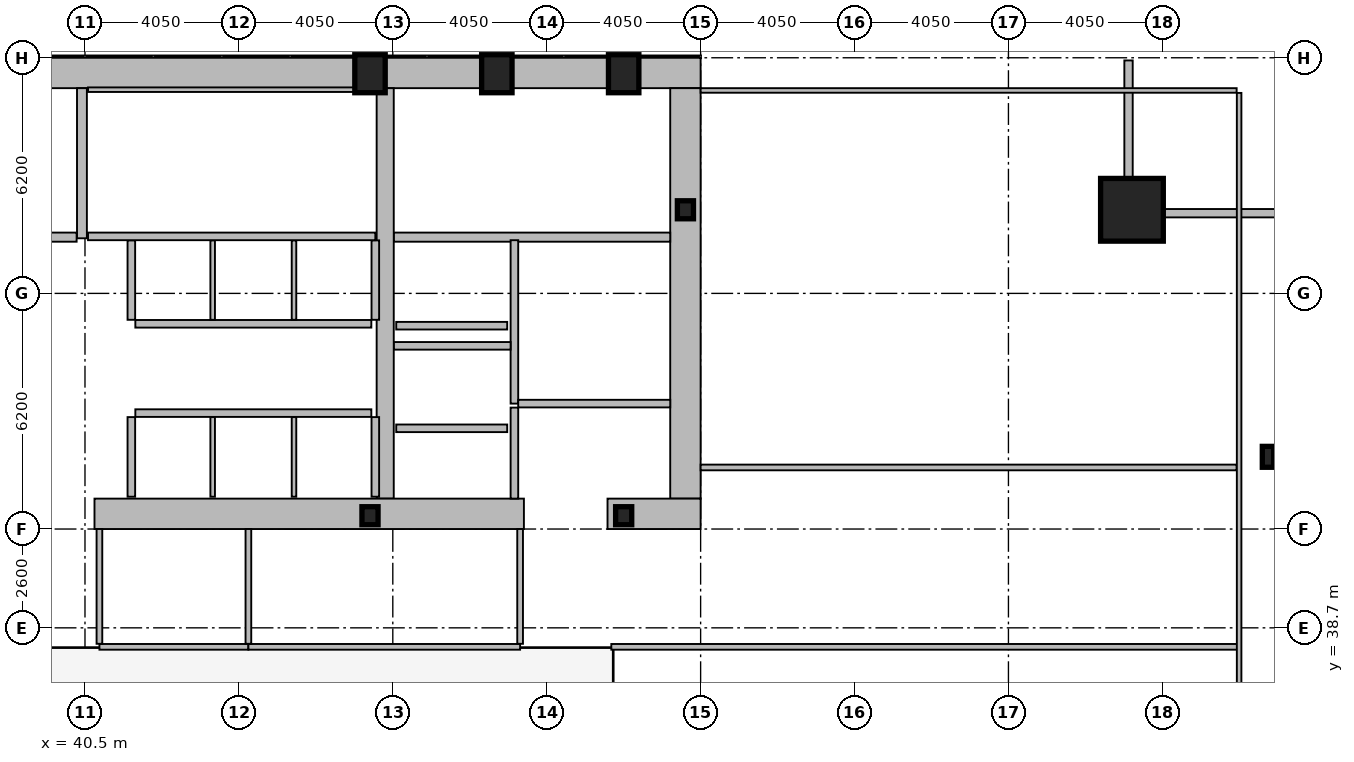
"""IFC4 building model, lengths in metres.
Left out: names, types, materials, properties, quantities, classifications, styles, units other than length and angle.
Written with IfcOpenShell. Run it as: python <this file> out.ifc"""

import sys

from ifc_helpers import new_model, si_unit, direction, frame, frame_2d, origin, origin_2d, place, context, subcontext, project, spatial, rectangle, hollow_rectangle, i_section, extrude, element, fill, save


model = new_model("IFC4")
c1 = context("Model", 3, precision=1e-05, world=origin(), true_north=direction((0.0, 1.0)))
c2 = subcontext(c1, "Body", "Model", "MODEL_VIEW")
j1 = project(units=[si_unit("LENGTHUNIT", "METRE"), si_unit("PLANEANGLEUNIT", "RADIAN")], contexts=[c1])
p1 = place(None, origin())
s1 = spatial("IfcSite", under=j1, at=p1, CompositionType="ELEMENT")
p2 = place(p1, origin())
s2 = spatial("IfcBuilding", under=s1, at=p2, CompositionType="ELEMENT")
p3 = place(p2, frame((0.0, 0.0, 25.8)))
s3 = spatial("IfcBuildingStorey", under=s2, at=p3, CompositionType="ELEMENT", Elevation=25.8)
p4 = place(p3, frame((16.2, 53.3, 0.0), z_axis=(0.0, 0.0, 1.0), x_axis=(1.0, 0.0, 0.0)))
e1 = element("IfcWall", 1, at=p4, inside=s3, PredefinedType="SHEAR", context=c2, shape_type="SweptSolid", body=[
    extrude(rectangle(XDim=40.5, YDim=0.8, at=frame_2d((20.25, 0.0))), origin(), (0.0, 0.0, 1.0), 3.82),
])
p5 = place(p3, frame((56.3, 52.9, 0.0), z_axis=(0.0, 0.0, 1.0), x_axis=(0.0, -1.0, 0.0)))
e2 = element("IfcWall", 2, at=p5, inside=s3, PredefinedType="SHEAR", context=c2, shape_type="SweptSolid", body=[
    extrude(rectangle(XDim=10.8, YDim=0.8, at=frame_2d((5.4, 0.0))), origin(), (0.0, 0.0, 1.0), 3.82),
])
p6 = place(p3, frame((48.4, 42.1, 0.0), z_axis=(0.0, 0.0, 1.0), x_axis=(0.0, 1.0, 0.0)))
e3 = element("IfcWall", 3, at=p6, inside=s3, PredefinedType="SHEAR", context=c2, shape_type="SweptSolid", body=[
    extrude(rectangle(XDim=10.8, YDim=0.45, at=frame_2d((5.4, 0.0))), origin(), (0.0, 0.0, 1.0), 3.82),
])
p7 = place(p3, frame((52.05, 41.7, 0.0), z_axis=(0.0, 0.0, 1.0), x_axis=(-1.0, 0.0, 0.0)))
e4 = element("IfcWall", 4, at=p7, inside=s3, PredefinedType="SHEAR", context=c2, shape_type="SweptSolid", body=[
    extrude(rectangle(XDim=11.3, YDim=0.8, at=frame_2d((5.65, 0.0))), origin(), (0.0, 0.0, 1.0), 3.82),
])
p8 = place(p3, frame((56.7, 41.7, 0.0), z_axis=(0.0, 0.0, 1.0), x_axis=(-1.0, 0.0, 0.0)))
e5 = element("IfcWall", 5, at=p8, inside=s3, PredefinedType="SHEAR", context=c2, shape_type="SweptSolid", body=[
    extrude(rectangle(XDim=2.45, YDim=0.8, at=frame_2d((1.225, 0.0))), origin(), (0.0, 0.0, 1.0), 3.82),
])
p9 = place(p3, frame((40.42, 48.95, 0.0), z_axis=(0.0, 0.0, 1.0), x_axis=(0.0, 1.0, 0.0)))
e6 = element("IfcWall", 6, at=p9, inside=s3, PredefinedType="SHEAR", context=c2, shape_type="SweptSolid", body=[
    extrude(rectangle(XDim=3.95, YDim=0.26, at=frame_2d((1.975, 0.0))), origin(), (0.0, 0.0, 1.0), 3.82),
])
p10 = place(p3, frame((48.63, 48.98, 0.0), z_axis=(0.0, 0.0, 1.0), x_axis=(1.0, 0.0, 0.0)))
e7 = element("IfcWall", 7, at=p10, inside=s3, PredefinedType="SHEAR", context=c2, shape_type="SweptSolid", body=[
    extrude(rectangle(XDim=7.27, YDim=0.24, at=frame_2d((3.635, 0.0))), origin(), (0.0, 0.0, 1.0), 3.82),
])
p11 = place(p10, frame((6.0, 0.0, 0.0)))
e8 = element("IfcOpeningElement", 8, at=p11, cuts=e7, PredefinedType="OPENING", context=c2, shape_type="SweptSolid", body=[
    extrude(rectangle(XDim=1.05, YDim=2.15, at=frame_2d((0.525, 1.075))), frame((0.0, 0.13, 0.0), z_axis=(0.0, -1.0, 0.0), x_axis=(1.0, 0.0, 0.0)), (0.0, 0.0, 1.0), 0.26),
])
p12 = place(p3, frame((32.72, 48.98, 0.0), z_axis=(0.0, 0.0, 1.0), x_axis=(1.0, 0.0, 0.0)))
e9 = element("IfcWall", 9, at=p12, inside=s3, PredefinedType="SHEAR", context=c2, shape_type="SweptSolid", body=[
    extrude(rectangle(XDim=7.56, YDim=0.24, at=frame_2d((3.78, 0.0))), origin(), (0.0, 0.0, 1.0), 3.82),
])
p13 = place(p12, frame((0.22, 0.0, 0.0)))
e10 = element("IfcOpeningElement", 10, at=p13, cuts=e9, PredefinedType="OPENING", context=c2, shape_type="SweptSolid", body=[
    extrude(rectangle(XDim=1.05, YDim=2.15, at=frame_2d((0.525, 1.075))), frame((0.0, 0.13, 0.0), z_axis=(0.0, -1.0, 0.0), x_axis=(1.0, 0.0, 0.0)), (0.0, 0.0, 1.0), 0.26),
])
p14 = place(p3, frame((68.05, 49.7, 0.0), z_axis=(0.0, 0.0, 1.0), x_axis=(1.0, 0.0, 0.0)))
e11 = element("IfcColumn", 11, at=p14, inside=s3, PredefinedType="COLUMN", context=c2, shape_type="SweptSolid", body=[
    extrude(hollow_rectangle(XDim=1.65, YDim=1.65, WallThickness=0.075, at=origin_2d()), origin(), (0.0, 0.0, 1.0), 4.0),
])
for number, where, z_axis, x_axis in (
    (12, (48.0, 53.28, 0.0), (0.0, 0.0, 1.0), (1.0, 0.0, 0.0)),
    (13, (51.337, 53.28, 0.0), (0.0, 0.0, 1.0), (1.0, 0.0, 0.0)),
    (14, (54.675, 53.28, 0.0), (0.0, 0.0, 1.0), (1.0, 0.0, 0.0)),
):
    element("IfcColumn", number, at=place(p3, frame(where, z_axis=z_axis, x_axis=x_axis)), inside=s3, PredefinedType="COLUMN", context=c2, shape_type="SweptSolid", body=[
        extrude(hollow_rectangle(XDim=0.8, YDim=1.0, WallThickness=0.055, at=origin_2d()), origin(), (0.0, 0.0, 1.0), 4.0),
    ])
p15 = place(p3, frame((71.63, 43.2, 0.0), z_axis=(0.0, 0.0, 1.0), x_axis=(1.0, 0.0, 0.0)))
e15 = element("IfcColumn", 15, at=p15, inside=s3, PredefinedType="COLUMN", context=c2, shape_type="SweptSolid", body=[
    extrude(i_section(OverallWidth=0.3, OverallDepth=0.55, WebThickness=0.015, FlangeThickness=0.029, at=origin_2d()), origin(), (0.0, 0.0, 1.0), 4.0),
])
for number, where, z_axis, x_axis in (
    (16, (56.3, 49.7, 0.0), (0.0, 0.0, 1.0), (1.0, 0.0, 0.0)),
    (17, (48.0, 41.65, 0.0), (0.0, 0.0, 1.0), (1.0, 0.0, 0.0)),
    (18, (54.675, 41.65, 0.0), (0.0, 0.0, 1.0), (1.0, 0.0, 0.0)),
):
    element("IfcColumn", number, at=place(p3, frame(where, z_axis=z_axis, x_axis=x_axis)), inside=s3, PredefinedType="COLUMN", context=c2, shape_type="SweptSolid", body=[
        extrude(i_section(OverallWidth=0.424, OverallDepth=0.474, WebThickness=0.048, FlangeThickness=0.077, at=origin_2d()), origin(), (0.0, 0.0, 1.0), 4.0),
    ])
p16 = place(p3, frame((67.96, 53.63, 0.0), z_axis=(0.0, 0.0, 1.0), x_axis=(0.0, -1.0, 0.0)))
e19 = element("IfcWall", 19, at=p16, inside=s3, PredefinedType="SOLIDWALL", context=c2, shape_type="SweptSolid", body=[
    extrude(rectangle(XDim=3.91, YDim=0.22, at=frame_2d((1.955, 0.0))), origin(), (0.0, 0.0, 1.0), 3.16),
])
p17 = place(p3, frame((67.85, 49.61, 0.0), z_axis=(0.0, 0.0, 1.0), x_axis=(1.0, 0.0, 0.0)))
e20 = element("IfcWall", 20, at=p17, inside=s3, PredefinedType="SOLIDWALL", context=c2, shape_type="SweptSolid", body=[
    extrude(rectangle(XDim=4.22, YDim=0.22, at=frame_2d((2.11, 0.0))), origin(), (0.0, 0.0, 1.0), 3.16),
])
p18 = place(p3, frame((51.61, 43.95, 0.0), z_axis=(0.0, 0.0, 1.0), x_axis=(-1.0, 0.0, 0.0)))
e21 = element("IfcWall", 21, at=p18, inside=s3, PredefinedType="PARTITIONING", context=c2, shape_type="SweptSolid", body=[
    extrude(rectangle(XDim=2.92, YDim=0.2, at=frame_2d((1.46, 0.0))), origin(), (0.0, 0.0, 1.0), 3.82),
])
p19 = place(p18, frame((0.81, 0.0, 0.0)))
e22 = element("IfcOpeningElement", 22, at=p19, cuts=e21, PredefinedType="OPENING", context=c2, shape_type="SweptSolid", body=[
    extrude(rectangle(XDim=1.3, YDim=2.18, at=frame_2d((0.65, 1.09))), frame((0.0, 0.11, 0.0), z_axis=(0.0, -1.0, 0.0), x_axis=(1.0, 0.0, 0.0)), (0.0, 0.0, 1.0), 0.22),
])
p20 = place(p3, frame((51.61, 46.65, 0.0), z_axis=(0.0, 0.0, 1.0), x_axis=(-1.0, 0.0, 0.0)))
e23 = element("IfcWall", 23, at=p20, inside=s3, PredefinedType="PARTITIONING", context=c2, shape_type="SweptSolid", body=[
    extrude(rectangle(XDim=2.92, YDim=0.2, at=frame_2d((1.46, 0.0))), origin(), (0.0, 0.0, 1.0), 3.82),
])
p21 = place(p20, frame((0.86, 0.0, 0.0)))
e24 = element("IfcOpeningElement", 24, at=p21, cuts=e23, PredefinedType="OPENING", context=c2, shape_type="SweptSolid", body=[
    extrude(rectangle(XDim=1.2, YDim=2.18, at=frame_2d((0.6, 1.09))), frame((0.0, 0.11, 0.0), z_axis=(0.0, -1.0, 0.0), x_axis=(1.0, 0.0, 0.0)), (0.0, 0.0, 1.0), 0.22),
])
p22 = place(p3, frame((51.8, 44.6, 0.0), z_axis=(0.0, 0.0, 1.0), x_axis=(0.0, 1.0, 0.0)))
e25 = element("IfcWall", 25, at=p22, inside=s3, PredefinedType="PARTITIONING", context=c2, shape_type="SweptSolid", body=[
    extrude(rectangle(XDim=4.3, YDim=0.2, at=frame_2d((2.15, 0.0))), origin(), (0.0, 0.0, 1.0), 3.82),
])
p23 = place(p3, frame((51.9, 44.6, 0.0), z_axis=(0.0, 0.0, 1.0), x_axis=(1.0, 0.0, 0.0)))
e26 = element("IfcWall", 26, at=p23, inside=s3, PredefinedType="PARTITIONING", context=c2, shape_type="SweptSolid", body=[
    extrude(rectangle(XDim=4.0, YDim=0.2, at=frame_2d((2.0, 0.0))), origin(), (0.0, 0.0, 1.0), 3.82),
])
p24 = place(p23, frame((1.15, 0.0, 0.0)))
e27 = element("IfcOpeningElement", 27, at=p24, cuts=e26, PredefinedType="OPENING", context=c2, shape_type="SweptSolid", body=[
    extrude(rectangle(XDim=1.05, YDim=2.15, at=frame_2d((0.525, 1.075))), frame((0.0, 0.11, 0.0), z_axis=(0.0, -1.0, 0.0), x_axis=(1.0, 0.0, 0.0)), (0.0, 0.0, 1.0), 0.22),
])
p25 = place(p3, frame((48.63, 46.12, 0.0), z_axis=(0.0, 0.0, 1.0), x_axis=(1.0, 0.0, 0.0)))
e28 = element("IfcWall", 28, at=p25, inside=s3, PredefinedType="PARTITIONING", context=c2, shape_type="SweptSolid", body=[
    extrude(rectangle(XDim=3.07, YDim=0.2, at=frame_2d((1.535, 0.0))), origin(), (0.0, 0.0, 1.0), 3.82),
])
p26 = place(p3, frame((51.8, 42.1, 0.0), z_axis=(0.0, 0.0, 1.0), x_axis=(0.0, 1.0, 0.0)))
e29 = element("IfcWall", 29, at=p26, inside=s3, PredefinedType="PARTITIONING", context=c2, shape_type="SweptSolid", body=[
    extrude(rectangle(XDim=2.395, YDim=0.2, at=frame_2d((1.198, 0.0))), origin(), (0.0, 0.0, 1.0), 3.82),
])
p27 = place(p26, frame((0.38, 0.0, 0.0)))
e30 = element("IfcOpeningElement", 30, at=p27, cuts=e29, PredefinedType="OPENING", context=c2, shape_type="SweptSolid", body=[
    extrude(rectangle(XDim=1.05, YDim=2.15, at=frame_2d((0.525, 1.075))), frame((0.0, 0.11, 0.0), z_axis=(0.0, -1.0, 0.0), x_axis=(1.0, 0.0, 0.0)), (0.0, 0.0, 1.0), 0.22),
])
p28 = place(p3, frame((41.825, 46.7, 0.0), z_axis=(0.0, 0.0, 1.0), x_axis=(1.0, 0.0, 0.0)))
e31 = element("IfcWall", 31, at=p28, inside=s3, PredefinedType="PARTITIONING", context=c2, shape_type="SweptSolid", body=[
    extrude(rectangle(XDim=6.21, YDim=0.2, at=frame_2d((3.105, 0.0))), origin(), (0.0, 0.0, 1.0), 3.82),
])
for number, where, z_axis, x_axis in (
    (32, (41.72, 46.805, 0.0), (0.0, 0.0, 1.0), (0.0, 1.0, 0.0)),
    (33, (48.14, 46.805, 0.0), (0.0, 0.0, 1.0), (0.0, 1.0, 0.0)),
):
    element("IfcWall", number, at=place(p3, frame(where, z_axis=z_axis, x_axis=x_axis)), inside=s3, PredefinedType="PARTITIONING", context=c2, shape_type="SweptSolid", body=[
        extrude(rectangle(XDim=2.09, YDim=0.2, at=frame_2d((1.045, 0.0))), origin(), (0.0, 0.0, 1.0), 3.82),
    ])
for number, where, z_axis, x_axis in (
    (34, (43.86, 46.805, 0.0), (0.0, 0.0, 1.0), (0.0, 1.0, 0.0)),
    (35, (46.0, 46.805, 0.0), (0.0, 0.0, 1.0), (0.0, 1.0, 0.0)),
):
    element("IfcWall", number, at=place(p3, frame(where, z_axis=z_axis, x_axis=x_axis)), inside=s3, PredefinedType="PARTITIONING", context=c2, shape_type="SweptSolid", body=[
        extrude(rectangle(XDim=2.09, YDim=0.12, at=frame_2d((1.045, 0.0))), origin(), (0.0, 0.0, 1.0), 3.82),
    ])
p29 = place(p3, frame((41.825, 44.35, 0.0), z_axis=(0.0, 0.0, 1.0), x_axis=(1.0, 0.0, 0.0)))
e36 = element("IfcWall", 36, at=p29, inside=s3, PredefinedType="PARTITIONING", context=c2, shape_type="SweptSolid", body=[
    extrude(rectangle(XDim=6.21, YDim=0.2, at=frame_2d((3.105, 0.0))), origin(), (0.0, 0.0, 1.0), 3.82),
])
for number, where, z_axis, x_axis in (
    (37, (41.72, 42.15, 0.0), (0.0, 0.0, 1.0), (0.0, 1.0, 0.0)),
    (38, (48.14, 42.15, 0.0), (0.0, 0.0, 1.0), (0.0, 1.0, 0.0)),
):
    element("IfcWall", number, at=place(p3, frame(where, z_axis=z_axis, x_axis=x_axis)), inside=s3, PredefinedType="PARTITIONING", context=c2, shape_type="SweptSolid", body=[
        extrude(rectangle(XDim=2.095, YDim=0.2, at=frame_2d((1.048, 0.0))), origin(), (0.0, 0.0, 1.0), 3.82),
    ])
for number, where, z_axis, x_axis in (
    (39, (43.86, 42.15, 0.0), (0.0, 0.0, 1.0), (0.0, 1.0, 0.0)),
    (40, (46.0, 42.15, 0.0), (0.0, 0.0, 1.0), (0.0, 1.0, 0.0)),
):
    element("IfcWall", number, at=place(p3, frame(where, z_axis=z_axis, x_axis=x_axis)), inside=s3, PredefinedType="PARTITIONING", context=c2, shape_type="SweptSolid", body=[
        extrude(rectangle(XDim=2.095, YDim=0.12, at=frame_2d((1.048, 0.0))), origin(), (0.0, 0.0, 1.0), 3.82),
    ])
p30 = place(p3, frame((40.58, 52.86, 0.0), z_axis=(0.0, 0.0, 1.0), x_axis=(1.0, 0.0, 0.0)))
e41 = element("IfcWall", 41, at=p30, inside=s3, PredefinedType="PARTITIONING", context=c2, shape_type="SweptSolid", body=[
    extrude(rectangle(XDim=7.56, YDim=0.12, at=frame_2d((3.78, 0.0))), origin(), (0.0, 0.0, 1.0), 3.82),
])
p31 = place(p3, frame((40.58, 49.0, 0.0), z_axis=(0.0, 0.0, 1.0), x_axis=(1.0, 0.0, 0.0)))
e42 = element("IfcWall", 42, at=p31, inside=s3, PredefinedType="PARTITIONING", context=c2, shape_type="SweptSolid", body=[
    extrude(rectangle(XDim=7.56, YDim=0.2, at=frame_2d((3.78, 0.0))), origin(), (0.0, 0.0, 1.0), 3.82),
])
p32 = place(p31, frame((0.16, 0.0, 0.0)))
e43 = element("IfcOpeningElement", 43, at=p32, cuts=e42, PredefinedType="OPENING", context=c2, shape_type="SweptSolid", body=[
    extrude(rectangle(XDim=0.95, YDim=2.1, at=frame_2d((0.475, 1.05))), frame((0.0, 0.11, 0.0), z_axis=(0.0, -1.0, 0.0), x_axis=(1.0, 0.0, 0.0)), (0.0, 0.0, 1.0), 0.22),
])
p33 = place(p3, frame((40.88, 38.2, 0.0), z_axis=(0.0, 0.0, 1.0), x_axis=(1.0, 0.0, 0.0)))
e44 = element("IfcWall", 44, at=p33, inside=s3, PredefinedType="PARTITIONING", context=c2, shape_type="SweptSolid", body=[
    extrude(rectangle(XDim=3.92, YDim=0.15, at=frame_2d((1.96, 0.0))), origin(), (0.0, 0.0, 1.0), 3.01),
])
p34 = place(p33, frame((1.1, 0.0, 0.0)))
e45 = element("IfcOpeningElement", 45, at=p34, cuts=e44, PredefinedType="OPENING", context=c2, shape_type="SweptSolid", body=[
    extrude(rectangle(XDim=0.9, YDim=2.05, at=frame_2d((0.45, 1.025))), frame((0.0, 0.085, 0.0), z_axis=(0.0, -1.0, 0.0), x_axis=(1.0, 0.0, 0.0)), (0.0, 0.0, 1.0), 0.17),
])
p35 = place(p3, frame((44.8, 38.2, 0.0), z_axis=(0.0, 0.0, 1.0), x_axis=(1.0, 0.0, 0.0)))
e46 = element("IfcWall", 46, at=p35, inside=s3, PredefinedType="PARTITIONING", context=c2, shape_type="SweptSolid", body=[
    extrude(rectangle(XDim=7.15, YDim=0.15, at=frame_2d((3.575, 0.0))), origin(), (0.0, 0.0, 1.0), 3.01),
])
p36 = place(p35, frame((1.1, 0.0, 0.0)))
e47 = element("IfcOpeningElement", 47, at=p36, cuts=e46, PredefinedType="OPENING", context=c2, shape_type="SweptSolid", body=[
    extrude(rectangle(XDim=1.0, YDim=2.05, at=frame_2d((0.5, 1.025))), frame((0.0, 0.085, 0.0), z_axis=(0.0, -1.0, 0.0), x_axis=(1.0, 0.0, 0.0)), (0.0, 0.0, 1.0), 0.17),
])
for number, where, z_axis, x_axis in (
    (48, (40.88, 38.28, 0.0), (0.0, 0.0, 1.0), (0.0, 1.0, 0.0)),
    (49, (44.8, 38.28, 0.0), (0.0, 0.0, 1.0), (0.0, 1.0, 0.0)),
    (50, (51.95, 38.28, 0.0), (0.0, 0.0, 1.0), (0.0, 1.0, 0.0)),
):
    element("IfcWall", number, at=place(p3, frame(where, z_axis=z_axis, x_axis=x_axis)), inside=s3, PredefinedType="PARTITIONING", context=c2, shape_type="SweptSolid", body=[
        extrude(rectangle(XDim=3.02, YDim=0.15, at=frame_2d((1.51, 0.0))), origin(), (0.0, 0.0, 1.0), 3.82),
    ])
p37 = place(p3, frame((54.35, 38.2, 0.0), z_axis=(0.0, 0.0, 1.0), x_axis=(1.0, 0.0, 0.0)))
e51 = element("IfcWall", 51, at=p37, inside=s3, PredefinedType="PARTITIONING", context=c2, shape_type="SweptSolid", body=[
    extrude(rectangle(XDim=16.52, YDim=0.15, at=frame_2d((8.26, 0.0))), origin(), (0.0, 0.0, 1.0), 3.01),
])
p38 = place(p37, frame((3.25, 0.0, 0.0)))
e52 = element("IfcOpeningElement", 52, at=p38, cuts=e51, PredefinedType="OPENING", context=c2, shape_type="SweptSolid", body=[
    extrude(rectangle(XDim=0.95, YDim=2.05, at=frame_2d((0.475, 1.025))), frame((0.0, 0.085, 0.0), z_axis=(0.0, -1.0, 0.0), x_axis=(1.0, 0.0, 0.0)), (0.0, 0.0, 1.0), 0.17),
])
p39 = place(p3, frame((56.7, 42.92, 0.0), z_axis=(0.0, 0.0, 1.0), x_axis=(1.0, 0.0, 0.0)))
e53 = element("IfcWall", 53, at=p39, inside=s3, PredefinedType="PARTITIONING", context=c2, shape_type="SweptSolid", body=[
    extrude(rectangle(XDim=14.105, YDim=0.15, at=frame_2d((7.052, 0.0))), origin(), (0.0, 0.0, 1.0), 3.01),
])
p40 = place(p39, frame((0.9, 0.0, 0.0)))
e54 = element("IfcOpeningElement", 54, at=p40, cuts=e53, PredefinedType="OPENING", context=c2, shape_type="SweptSolid", body=[
    extrude(rectangle(XDim=0.9, YDim=2.05, at=frame_2d((0.45, 1.025))), frame((0.0, 0.085, 0.0), z_axis=(0.0, -1.0, 0.0), x_axis=(1.0, 0.0, 0.0)), (0.0, 0.0, 1.0), 0.17),
])
p41 = place(p3, frame((70.87, 10.665, 0.0), z_axis=(0.0, 0.0, 1.0), x_axis=(0.0, 1.0, 0.0)))
e55 = element("IfcWall", 55, at=p41, inside=s3, PredefinedType="PARTITIONING", context=c2, shape_type="SweptSolid", body=[
    extrude(rectangle(XDim=42.11, YDim=0.12, at=frame_2d((21.055, 0.0))), origin(), (0.0, 0.0, 1.0), 3.01),
])
p42 = place(p3, frame((56.7, 52.84, 0.0), z_axis=(0.0, 0.0, 1.0), x_axis=(1.0, 0.0, 0.0)))
e56 = element("IfcWall", 56, at=p42, inside=s3, PredefinedType="PARTITIONING", context=c2, shape_type="SweptSolid", body=[
    extrude(rectangle(XDim=14.105, YDim=0.12, at=frame_2d((7.052, 0.0))), origin(), (0.0, 0.0, 1.0), 3.82),
])
p43 = place(p11, origin())
e57 = element("IfcDoor", 57, at=p43, inside=s3, OperationType="SINGLE_SWING_RIGHT", PredefinedType="DOOR", context=c2, shape_type="SweptSolid", body=[
    extrude(rectangle(XDim=1.05, YDim=2.15, at=frame_2d((0.525, 1.075))), frame((0.0, 0.025, 0.0), z_axis=(0.0, -1.0, 0.0), x_axis=(1.0, 0.0, 0.0)), (0.0, 0.0, 1.0), 0.05),
])
fill(e8, e57)
p44 = place(p19, origin())
e58 = element("IfcDoor", 58, at=p44, inside=s3, OperationType="SLIDING_TO_LEFT", PredefinedType="DOOR", context=c2, shape_type="SweptSolid", body=[
    extrude(rectangle(XDim=1.3, YDim=2.18, at=frame_2d((0.65, 1.09))), frame((0.0, 0.025, 0.0), z_axis=(0.0, -1.0, 0.0), x_axis=(1.0, 0.0, 0.0)), (0.0, 0.0, 1.0), 0.05),
])
fill(e22, e58)
p45 = place(p21, origin())
e59 = element("IfcDoor", 59, at=p45, inside=s3, OperationType="SLIDING_TO_LEFT", PredefinedType="DOOR", context=c2, shape_type="SweptSolid", body=[
    extrude(rectangle(XDim=1.2, YDim=2.18, at=frame_2d((0.6, 1.09))), frame((0.0, 0.025, 0.0), z_axis=(0.0, -1.0, 0.0), x_axis=(1.0, 0.0, 0.0)), (0.0, 0.0, 1.0), 0.05),
])
fill(e24, e59)
p46 = place(p24, origin())
e60 = element("IfcDoor", 60, at=p46, inside=s3, OperationType="SINGLE_SWING_RIGHT", PredefinedType="DOOR", context=c2, shape_type="SweptSolid", body=[
    extrude(rectangle(XDim=1.05, YDim=2.15, at=frame_2d((0.525, 1.075))), frame((0.0, 0.025, 0.0), z_axis=(0.0, -1.0, 0.0), x_axis=(1.0, 0.0, 0.0)), (0.0, 0.0, 1.0), 0.05),
])
fill(e27, e60)
p47 = place(p27, origin())
e61 = element("IfcDoor", 61, at=p47, inside=s3, OperationType="SINGLE_SWING_LEFT", PredefinedType="DOOR", context=c2, shape_type="SweptSolid", body=[
    extrude(rectangle(XDim=1.05, YDim=2.15, at=frame_2d((0.525, 1.075))), frame((0.0, 0.025, 0.0), z_axis=(0.0, -1.0, 0.0), x_axis=(1.0, 0.0, 0.0)), (0.0, 0.0, 1.0), 0.05),
])
fill(e30, e61)
p48 = place(p32, origin())
e62 = element("IfcDoor", 62, at=p48, inside=s3, OperationType="SINGLE_SWING_RIGHT", PredefinedType="DOOR", context=c2, shape_type="SweptSolid", body=[
    extrude(rectangle(XDim=0.95, YDim=2.1, at=frame_2d((0.475, 1.05))), frame((0.0, 0.025, 0.0), z_axis=(0.0, -1.0, 0.0), x_axis=(1.0, 0.0, 0.0)), (0.0, 0.0, 1.0), 0.05),
])
fill(e43, e62)
p49 = place(p34, origin())
e63 = element("IfcDoor", 63, at=p49, inside=s3, OperationType="SINGLE_SWING_RIGHT", PredefinedType="DOOR", context=c2, shape_type="SweptSolid", body=[
    extrude(rectangle(XDim=0.9, YDim=2.05, at=frame_2d((0.45, 1.025))), frame((0.0, 0.025, 0.0), z_axis=(0.0, -1.0, 0.0), x_axis=(1.0, 0.0, 0.0)), (0.0, 0.0, 1.0), 0.05),
])
fill(e45, e63)
p50 = place(p36, origin())
e64 = element("IfcDoor", 64, at=p50, inside=s3, OperationType="SINGLE_SWING_LEFT", PredefinedType="DOOR", context=c2, shape_type="SweptSolid", body=[
    extrude(rectangle(XDim=1.0, YDim=2.05, at=frame_2d((0.5, 1.025))), frame((0.0, 0.025, 0.0), z_axis=(0.0, -1.0, 0.0), x_axis=(1.0, 0.0, 0.0)), (0.0, 0.0, 1.0), 0.05),
])
fill(e47, e64)
p51 = place(p38, origin())
e65 = element("IfcDoor", 65, at=p51, inside=s3, OperationType="SINGLE_SWING_LEFT", PredefinedType="DOOR", context=c2, shape_type="SweptSolid", body=[
    extrude(rectangle(XDim=0.95, YDim=2.05, at=frame_2d((0.475, 1.025))), frame((0.0, 0.025, 0.0), z_axis=(0.0, -1.0, 0.0), x_axis=(1.0, 0.0, 0.0)), (0.0, 0.0, 1.0), 0.05),
])
fill(e52, e65)
p52 = place(p40, origin())
e66 = element("IfcDoor", 66, at=p52, inside=s3, OperationType="SINGLE_SWING_LEFT", PredefinedType="DOOR", context=c2, shape_type="SweptSolid", body=[
    extrude(rectangle(XDim=0.9, YDim=2.05, at=frame_2d((0.45, 1.025))), frame((0.0, 0.025, 0.0), z_axis=(0.0, -1.0, 0.0), x_axis=(1.0, 0.0, 0.0)), (0.0, 0.0, 1.0), 0.05),
])
fill(e54, e66)
save(model, sys.argv[1])
